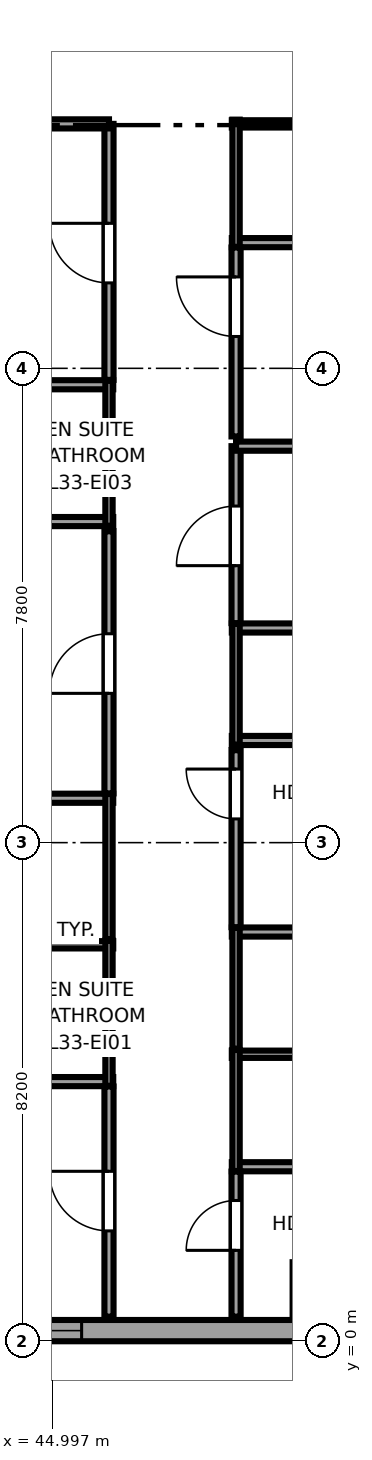
"""IFC4 building model, lengths in metres.
Left out: names, types, materials, properties, quantities, classifications, styles, units other than length and angle.
Written with IfcOpenShell. Run it as: python <this file> out.ifc"""

import sys

from ifc_helpers import new_model, si_unit, direction, frame, frame_2d, origin, place, context, subcontext, project, spatial, rectangle, extrude, source, transform, mapped, element, fill, save


model = new_model("IFC4")
c1 = context("Model", 3, precision=1e-05, world=origin(), true_north=direction((0.0, 1.0)))
c2 = subcontext(c1, "Body", "Model", "MODEL_VIEW")
j1 = project(units=[si_unit("LENGTHUNIT", "METRE"), si_unit("PLANEANGLEUNIT", "RADIAN")], contexts=[c1])
p1 = place(None, origin())
s1 = spatial("IfcSite", under=j1, at=p1, CompositionType="ELEMENT")
p2 = place(p1, origin())
s2 = spatial("IfcBuilding", under=s1, at=p2, CompositionType="ELEMENT")
p3 = place(p2, frame((0.0, 0.0, 129.3)))
s3 = spatial("IfcBuildingStorey", under=s2, at=p3, CompositionType="ELEMENT", Elevation=129.3)
p4 = place(p3, frame((34.375, 0.175, 0.0), z_axis=(0.0, 0.0, 1.0), x_axis=(1.0, 0.0, 0.0)))
e1 = element("IfcWall", 1, at=p4, inside=s3, PredefinedType="SOLIDWALL", context=c2, shape_type="SweptSolid", body=[
    extrude(rectangle(XDim=18.008, YDim=0.35, at=frame_2d((9.004, 0.0))), origin(), (0.0, 0.0, 1.0), 3.37),
])
p5 = place(p4, frame((1.651, 0.0, 0.68)))
e2 = element("IfcOpeningElement", 2, at=p5, cuts=e1, PredefinedType="OPENING", context=c2, shape_type="SweptSolid", body=[
    extrude(rectangle(XDim=2.1, YDim=1.9, at=frame_2d((1.05, 0.95))), frame((0.0, 0.185, 0.0), z_axis=(0.0, -1.0, 0.0), x_axis=(1.0, 0.0, 0.0)), (0.0, 0.0, 1.0), 0.37),
])
p6 = place(p4, frame((9.005, 0.0, 0.68)))
e3 = element("IfcOpeningElement", 3, at=p6, cuts=e1, PredefinedType="OPENING", context=c2, shape_type="SweptSolid", body=[
    extrude(rectangle(XDim=2.1, YDim=1.9, at=frame_2d((1.05, 0.95))), frame((0.0, 0.185, 0.0), z_axis=(0.0, -1.0, 0.0), x_axis=(1.0, 0.0, 0.0)), (0.0, 0.0, 1.0), 0.37),
])
p7 = place(p4, frame((14.991, 0.0, 0.62)))
e4 = element("IfcOpeningElement", 4, at=p7, cuts=e1, PredefinedType="OPENING", context=c2, shape_type="SweptSolid", body=[
    extrude(rectangle(XDim=1.5, YDim=1.55, at=frame_2d((0.75, 0.775))), frame((0.0, 0.185, 0.0), z_axis=(0.0, -1.0, 0.0), x_axis=(1.0, 0.0, 0.0)), (0.0, 0.0, 1.0), 0.37),
])
p8 = place(p3, frame((43.41, 4.27, 0.0), z_axis=(0.0, 0.0, 1.0), x_axis=(1.0, 0.0, 0.0)))
e5 = element("IfcWall", 5, at=p8, inside=s3, PredefinedType="PARTITIONING", context=c2, shape_type="SweptSolid", body=[
    extrude(rectangle(XDim=2.59, YDim=0.15, at=frame_2d((1.295, 0.0))), origin(), (0.0, 0.0, 1.0), 3.37),
])
p9 = place(p3, frame((43.41, 6.52, 0.0), z_axis=(0.0, 0.0, 1.0), x_axis=(1.0, 0.0, 0.0)))
e6 = element("IfcWall", 6, at=p9, inside=s3, PredefinedType="PLUMBINGWALL", context=c2, shape_type="SweptSolid", body=[
    extrude(rectangle(XDim=2.59, YDim=0.12, at=frame_2d((1.295, 0.0))), origin(), (0.0, 0.0, 1.0), 3.37),
])
p10 = place(p3, frame((45.93, 4.2, 0.0), z_axis=(0.0, 0.0, 1.0), x_axis=(0.0, 1.0, 0.0)))
e7 = element("IfcWall", 7, at=p10, inside=s3, PredefinedType="PLUMBINGWALL", context=c2, shape_type="SweptSolid", body=[
    extrude(rectangle(XDim=2.39, YDim=0.12, at=frame_2d((1.195, 0.0))), origin(), (0.0, 0.0, 1.0), 3.37),
])
p11 = place(p3, frame((43.41, 8.93, 0.0), z_axis=(0.0, 0.0, 1.0), x_axis=(1.0, 0.0, 0.0)))
e8 = element("IfcWall", 8, at=p11, inside=s3, PredefinedType="PARTITIONING", context=c2, shape_type="SweptSolid", body=[
    extrude(rectangle(XDim=2.59, YDim=0.15, at=frame_2d((1.295, 0.0))), origin(), (0.0, 0.0, 1.0), 3.37),
])
p12 = place(p3, frame((45.93, 6.61, 0.0), z_axis=(0.0, 0.0, 1.0), x_axis=(0.0, 1.0, 0.0)))
e9 = element("IfcWall", 9, at=p12, inside=s3, PredefinedType="PLUMBINGWALL", context=c2, shape_type="SweptSolid", body=[
    extrude(rectangle(XDim=2.39, YDim=0.12, at=frame_2d((1.195, 0.0))), origin(), (0.0, 0.0, 1.0), 3.37),
])
p13 = place(p3, frame((34.65, 13.48, 0.0), z_axis=(0.0, 0.0, 1.0), x_axis=(1.0, 0.0, 0.0)))
e10 = element("IfcWall", 10, at=p13, inside=s3, PredefinedType="PARTITIONING", context=c2, shape_type="SweptSolid", body=[
    extrude(rectangle(XDim=11.35, YDim=0.15, at=frame_2d((5.675, 0.0))), origin(), (0.0, 0.0, 1.0), 3.37),
])
p14 = place(p3, frame((43.41, 15.73, 0.0), z_axis=(0.0, 0.0, 1.0), x_axis=(1.0, 0.0, 0.0)))
e11 = element("IfcWall", 11, at=p14, inside=s3, PredefinedType="PARTITIONING", context=c2, shape_type="SweptSolid", body=[
    extrude(rectangle(XDim=2.59, YDim=0.15, at=frame_2d((1.295, 0.0))), origin(), (0.0, 0.0, 1.0), 3.37),
])
p15 = place(p3, frame((45.93, 13.41, 0.0), z_axis=(0.0, 0.0, 1.0), x_axis=(0.0, 1.0, 0.0)))
e12 = element("IfcWall", 12, at=p15, inside=s3, PredefinedType="PLUMBINGWALL", context=c2, shape_type="SweptSolid", body=[
    extrude(rectangle(XDim=2.39, YDim=0.12, at=frame_2d((1.195, 0.0))), origin(), (0.0, 0.0, 1.0), 3.37),
])
p16 = place(p3, frame((47.95, 2.87, 0.0), z_axis=(0.0, 0.0, 1.0), x_axis=(1.0, 0.0, 0.0)))
e13 = element("IfcWall", 13, at=p16, inside=s3, PredefinedType="PARTITIONING", context=c2, shape_type="SweptSolid", body=[
    extrude(rectangle(XDim=2.59, YDim=0.15, at=frame_2d((1.295, 0.0))), origin(), (0.0, 0.0, 1.0), 3.37),
])
p17 = place(p3, frame((47.95, 4.72, 0.0), z_axis=(0.0, 0.0, 1.0), x_axis=(1.0, 0.0, 0.0)))
e14 = element("IfcWall", 14, at=p17, inside=s3, PredefinedType="PLUMBINGWALL", context=c2, shape_type="SweptSolid", body=[
    extrude(rectangle(XDim=2.59, YDim=0.12, at=frame_2d((1.295, 0.0))), origin(), (0.0, 0.0, 1.0), 3.37),
])
p18 = place(p3, frame((48.02, 2.8, 0.0), z_axis=(0.0, 0.0, 1.0), x_axis=(0.0, 1.0, 0.0)))
e15 = element("IfcWall", 15, at=p18, inside=s3, PredefinedType="PLUMBINGWALL", context=c2, shape_type="SweptSolid", body=[
    extrude(rectangle(XDim=1.99, YDim=0.12, at=frame_2d((0.995, 0.0))), origin(), (0.0, 0.0, 1.0), 3.37),
])
p19 = place(p3, frame((47.95, 6.73, 0.0), z_axis=(0.0, 0.0, 1.0), x_axis=(1.0, 0.0, 0.0)))
e16 = element("IfcWall", 16, at=p19, inside=s3, PredefinedType="PARTITIONING", context=c2, shape_type="SweptSolid", body=[
    extrude(rectangle(XDim=2.59, YDim=0.15, at=frame_2d((1.295, 0.0))), origin(), (0.0, 0.0, 1.0), 3.37),
])
p20 = place(p3, frame((48.02, 4.81, 0.0), z_axis=(0.0, 0.0, 1.0), x_axis=(0.0, 1.0, 0.0)))
e17 = element("IfcWall", 17, at=p20, inside=s3, PredefinedType="PLUMBINGWALL", context=c2, shape_type="SweptSolid", body=[
    extrude(rectangle(XDim=1.99, YDim=0.12, at=frame_2d((0.995, 0.0))), origin(), (0.0, 0.0, 1.0), 3.37),
])
p21 = place(p3, frame((47.95, 9.88, 0.0), z_axis=(0.0, 0.0, 1.0), x_axis=(1.0, 0.0, 0.0)))
e18 = element("IfcWall", 18, at=p21, inside=s3, PredefinedType="PARTITIONING", context=c2, shape_type="SweptSolid", body=[
    extrude(rectangle(XDim=8.645, YDim=0.15, at=frame_2d((4.323, 0.0))), origin(), (0.0, 0.0, 1.0), 3.37),
])
p22 = place(p3, frame((47.95, 11.73, 0.0), z_axis=(0.0, 0.0, 1.0), x_axis=(1.0, 0.0, 0.0)))
e19 = element("IfcWall", 19, at=p22, inside=s3, PredefinedType="PARTITIONING", context=c2, shape_type="SweptSolid", body=[
    extrude(rectangle(XDim=2.59, YDim=0.15, at=frame_2d((1.295, 0.0))), origin(), (0.0, 0.0, 1.0), 3.37),
])
p23 = place(p3, frame((48.02, 9.81, 0.0), z_axis=(0.0, 0.0, 1.0), x_axis=(0.0, 1.0, 0.0)))
e20 = element("IfcWall", 20, at=p23, inside=s3, PredefinedType="PLUMBINGWALL", context=c2, shape_type="SweptSolid", body=[
    extrude(rectangle(XDim=1.99, YDim=0.12, at=frame_2d((0.995, 0.0))), origin(), (0.0, 0.0, 1.0), 3.37),
])
p24 = place(p3, frame((47.95, 18.067, 0.0), z_axis=(0.0, 0.0, 1.0), x_axis=(1.0, 0.0, 0.0)))
e21 = element("IfcWall", 21, at=p24, inside=s3, PredefinedType="PARTITIONING", context=c2, shape_type="SweptSolid", body=[
    extrude(rectangle(XDim=2.59, YDim=0.15, at=frame_2d((1.295, 0.0))), origin(), (0.0, 0.0, 1.0), 3.37),
])
p25 = place(p3, frame((47.95, 20.02, 0.0), z_axis=(0.0, 0.0, 1.0), x_axis=(1.0, 0.0, 0.0)))
e22 = element("IfcWall", 22, at=p25, inside=s3, PredefinedType="PLUMBINGWALL", context=c2, shape_type="SweptSolid", body=[
    extrude(rectangle(XDim=2.59, YDim=0.12, at=frame_2d((1.295, 0.0))), origin(), (0.0, 0.0, 1.0), 3.37),
])
p26 = place(p3, frame((48.02, 17.997, 0.0), z_axis=(0.0, 0.0, 1.0), x_axis=(0.0, 1.0, 0.0)))
e23 = element("IfcWall", 23, at=p26, inside=s3, PredefinedType="PLUMBINGWALL", context=c2, shape_type="SweptSolid", body=[
    extrude(rectangle(XDim=2.093, YDim=0.12, at=frame_2d((1.046, 0.0))), origin(), (0.0, 0.0, 1.0), 3.37),
])
p27 = place(p3, frame((45.93, 0.405, 0.0), z_axis=(0.0, 0.0, 1.0), x_axis=(0.0, 1.0, 0.0)))
e24 = element("IfcWall", 24, at=p27, inside=s3, PredefinedType="PARTITIONING", context=c2, shape_type="SweptSolid", body=[
    extrude(rectangle(XDim=3.785, YDim=0.15, at=frame_2d((1.893, 0.0))), origin(), (0.0, 0.0, 1.0), 3.37),
])
p28 = place(p27, frame((1.41, 0.0, 0.0)))
e25 = element("IfcOpeningElement", 25, at=p28, cuts=e24, PredefinedType="OPENING", context=c2, shape_type="SweptSolid", body=[
    extrude(rectangle(XDim=0.98, YDim=2.12, at=frame_2d((0.49, 1.06))), frame((0.0, 0.085, 0.0), z_axis=(0.0, -1.0, 0.0), x_axis=(1.0, 0.0, 0.0)), (0.0, 0.0, 1.0), 0.17),
])
p29 = place(p3, frame((45.93, 9.01, 0.0), z_axis=(0.0, 0.0, 1.0), x_axis=(0.0, 1.0, 0.0)))
e26 = element("IfcWall", 26, at=p29, inside=s3, PredefinedType="PARTITIONING", context=c2, shape_type="SweptSolid", body=[
    extrude(rectangle(XDim=4.31, YDim=0.15, at=frame_2d((2.155, 0.0))), origin(), (0.0, 0.0, 1.0), 3.37),
])
p30 = place(p29, frame((1.645, 0.0, 0.0)))
e27 = element("IfcOpeningElement", 27, at=p30, cuts=e26, PredefinedType="OPENING", context=c2, shape_type="SweptSolid", body=[
    extrude(rectangle(XDim=0.98, YDim=2.12, at=frame_2d((0.49, 1.06))), frame((0.0, 0.085, 0.0), z_axis=(0.0, -1.0, 0.0), x_axis=(1.0, 0.0, 0.0)), (0.0, 0.0, 1.0), 0.17),
])
p31 = place(p3, frame((45.93, 15.81, 0.0), z_axis=(0.0, 0.0, 1.0), x_axis=(0.0, 1.0, 0.0)))
e28 = element("IfcWall", 28, at=p31, inside=s3, PredefinedType="PARTITIONING", context=c2, shape_type="SweptSolid", body=[
    extrude(rectangle(XDim=4.21, YDim=0.15, at=frame_2d((2.105, 0.0))), origin(), (0.0, 0.0, 1.0), 3.37),
])
p32 = place(p31, frame((1.595, 0.0, 0.0)))
e29 = element("IfcOpeningElement", 29, at=p32, cuts=e28, PredefinedType="OPENING", context=c2, shape_type="SweptSolid", body=[
    extrude(rectangle(XDim=0.98, YDim=2.12, at=frame_2d((0.49, 1.06))), frame((0.0, 0.085, 0.0), z_axis=(0.0, -1.0, 0.0), x_axis=(1.0, 0.0, 0.0)), (0.0, 0.0, 1.0), 0.17),
])
p33 = place(p3, frame((34.65, 20.02, 0.0), z_axis=(0.0, 0.0, 1.0), x_axis=(1.0, 0.0, 0.0)))
e30 = element("IfcWall", 30, at=p33, inside=s3, PredefinedType="PARTITIONING", context=c2, shape_type="SweptSolid", body=[
    extrude(rectangle(XDim=11.28, YDim=0.15, at=frame_2d((5.64, 0.0))), origin(), (0.0, 0.0, 1.0), 2.954),
])
p34 = place(p3, frame((48.02, 0.405, 0.0), z_axis=(0.0, 0.0, 1.0), x_axis=(0.0, 1.0, 0.0)))
e31 = element("IfcWall", 31, at=p34, inside=s3, PredefinedType="PARTITIONING", context=c2, shape_type="SweptSolid", body=[
    extrude(rectangle(XDim=2.385, YDim=0.15, at=frame_2d((1.192, 0.0))), origin(), (0.0, 0.0, 1.0), 3.37),
])
p35 = place(p34, frame((1.09, 0.0, 0.0)))
e32 = element("IfcOpeningElement", 32, at=p35, cuts=e31, PredefinedType="OPENING", context=c2, shape_type="SweptSolid", body=[
    extrude(rectangle(XDim=0.82, YDim=2.01, at=frame_2d((0.41, 1.005))), frame((0.0, 0.085, 0.0), z_axis=(0.0, -1.0, 0.0), x_axis=(1.0, 0.0, 0.0)), (0.0, 0.0, 1.0), 0.17),
])
p36 = place(p3, frame((48.02, 6.81, 0.0), z_axis=(0.0, 0.0, 1.0), x_axis=(0.0, 1.0, 0.0)))
e33 = element("IfcWall", 33, at=p36, inside=s3, PredefinedType="PARTITIONING", context=c2, shape_type="SweptSolid", body=[
    extrude(rectangle(XDim=2.91, YDim=0.15, at=frame_2d((1.455, 0.0))), origin(), (0.0, 0.0, 1.0), 3.37),
])
p37 = place(p36, frame((1.78, 0.0, 0.0)))
e34 = element("IfcOpeningElement", 34, at=p37, cuts=e33, PredefinedType="OPENING", context=c2, shape_type="SweptSolid", body=[
    extrude(rectangle(XDim=0.82, YDim=2.01, at=frame_2d((0.41, 1.005))), frame((0.0, 0.085, 0.0), z_axis=(0.0, -1.0, 0.0), x_axis=(1.0, 0.0, 0.0)), (0.0, 0.0, 1.0), 0.17),
])
p38 = place(p3, frame((48.02, 11.81, 0.0), z_axis=(0.0, 0.0, 1.0), x_axis=(0.0, 1.0, 0.0)))
e35 = element("IfcWall", 35, at=p38, inside=s3, PredefinedType="PARTITIONING", context=c2, shape_type="SweptSolid", body=[
    extrude(rectangle(XDim=2.91, YDim=0.15, at=frame_2d((1.455, 0.0))), origin(), (0.0, 0.0, 1.0), 3.37),
])
p39 = place(p38, frame((0.945, 0.0, 0.0)))
e36 = element("IfcOpeningElement", 36, at=p39, cuts=e35, PredefinedType="OPENING", context=c2, shape_type="SweptSolid", body=[
    extrude(rectangle(XDim=0.98, YDim=2.12, at=frame_2d((0.49, 1.06))), frame((0.0, 0.085, 0.0), z_axis=(0.0, -1.0, 0.0), x_axis=(1.0, 0.0, 0.0)), (0.0, 0.0, 1.0), 0.17),
])
p40 = place(p3, frame((48.02, 14.72, 0.0), z_axis=(0.0, 0.0, 1.0), x_axis=(1.0, 0.0, 0.0)))
e37 = element("IfcWall", 37, at=p40, inside=s3, PredefinedType="PARTITIONING", context=c2, shape_type="SweptSolid", body=[
    extrude(rectangle(XDim=8.575, YDim=0.15, at=frame_2d((4.288, 0.0))), origin(), (0.0, 0.0, 1.0), 3.37),
])
p41 = place(p3, frame((48.02, 14.88, 0.0), z_axis=(0.0, 0.0, 1.0), x_axis=(0.0, 1.0, 0.0)))
e38 = element("IfcWall", 38, at=p41, inside=s3, PredefinedType="PARTITIONING", context=c2, shape_type="SweptSolid", body=[
    extrude(rectangle(XDim=3.107, YDim=0.15, at=frame_2d((1.554, 0.0))), origin(), (0.0, 0.0, 1.0), 3.37),
])
p42 = place(p41, frame((1.644, 0.0, 0.0)))
e39 = element("IfcOpeningElement", 39, at=p42, cuts=e38, PredefinedType="OPENING", context=c2, shape_type="SweptSolid", body=[
    extrude(rectangle(XDim=0.98, YDim=2.12, at=frame_2d((0.49, 1.06))), frame((0.0, 0.085, 0.0), z_axis=(0.0, -1.0, 0.0), x_axis=(1.0, 0.0, 0.0)), (0.0, 0.0, 1.0), 0.17),
])
m1 = source(origin(), c2, "Body", "SweptSolid", [
    extrude(rectangle(XDim=2.1, YDim=1.9, at=frame_2d((1.05, 0.95))), frame((0.0, 0.09, 0.0), z_axis=(0.0, -1.0, 0.0), x_axis=(1.0, 0.0, 0.0)), (0.0, 0.0, 1.0), 0.06),
])
p43 = place(p6, origin())
e40 = element("IfcWindow", 40, at=p43, inside=s3, PartitioningType="TRIPLE_PANEL_HORIZONTAL", PredefinedType="WINDOW", context=c2, shape_type="MappedRepresentation", body=[
    mapped(m1, transform((0.0, 0.0, 0.0), x_axis=(1.0, 0.0, 0.0), y_axis=(0.0, 1.0, 0.0), z_axis=(0.0, 0.0, 1.0), scale=1.0)),
])
fill(e3, e40)
m2 = source(origin(), c2, "Body", "SweptSolid", [
    extrude(rectangle(XDim=0.98, YDim=2.12, at=frame_2d((0.49, 1.06))), frame((0.0, 0.025, 0.0), z_axis=(0.0, -1.0, 0.0), x_axis=(1.0, 0.0, 0.0)), (0.0, 0.0, 1.0), 0.05),
])
p44 = place(p28, origin())
e41 = element("IfcDoor", 41, at=p44, inside=s3, OperationType="SINGLE_SWING_RIGHT", PredefinedType="DOOR", context=c2, shape_type="MappedRepresentation", body=[
    mapped(m2, transform((0.0, 0.0, 0.0), x_axis=(1.0, 0.0, 0.0), y_axis=(0.0, 1.0, 0.0), z_axis=(0.0, 0.0, 1.0), scale=1.0)),
])
fill(e25, e41)
p45 = place(p30, origin())
e42 = element("IfcDoor", 42, at=p45, inside=s3, OperationType="SINGLE_SWING_LEFT", PredefinedType="DOOR", context=c2, shape_type="MappedRepresentation", body=[
    mapped(m2, transform((0.0, 0.0, 0.0), x_axis=(1.0, 0.0, 0.0), y_axis=(0.0, 1.0, 0.0), z_axis=(0.0, 0.0, 1.0), scale=1.0)),
])
fill(e27, e42)
p46 = place(p32, origin())
e43 = element("IfcDoor", 43, at=p46, inside=s3, OperationType="SINGLE_SWING_RIGHT", PredefinedType="DOOR", context=c2, shape_type="MappedRepresentation", body=[
    mapped(m2, transform((0.0, 0.0, 0.0), x_axis=(1.0, 0.0, 0.0), y_axis=(0.0, 1.0, 0.0), z_axis=(0.0, 0.0, 1.0), scale=1.0)),
])
fill(e29, e43)
m3 = source(origin(), c2, "Body", "SweptSolid", [
    extrude(rectangle(XDim=0.82, YDim=2.01, at=frame_2d((0.41, 1.005))), frame((0.0, 0.025, 0.0), z_axis=(0.0, -1.0, 0.0), x_axis=(1.0, 0.0, 0.0)), (0.0, 0.0, 1.0), 0.05),
])
p47 = place(p35, origin())
e44 = element("IfcDoor", 44, at=p47, inside=s3, OperationType="SINGLE_SWING_LEFT", PredefinedType="DOOR", context=c2, shape_type="MappedRepresentation", body=[
    mapped(m3, transform((0.0, 0.0, 0.0), x_axis=(1.0, 0.0, 0.0), y_axis=(0.0, 1.0, 0.0), z_axis=(0.0, 0.0, 1.0), scale=1.0)),
])
fill(e32, e44)
p48 = place(p37, origin())
e45 = element("IfcDoor", 45, at=p48, inside=s3, OperationType="SINGLE_SWING_RIGHT", PredefinedType="DOOR", context=c2, shape_type="MappedRepresentation", body=[
    mapped(m3, transform((0.0, 0.0, 0.0), x_axis=(1.0, 0.0, 0.0), y_axis=(0.0, 1.0, 0.0), z_axis=(0.0, 0.0, 1.0), scale=1.0)),
])
fill(e34, e45)
p49 = place(p39, origin())
e46 = element("IfcDoor", 46, at=p49, inside=s3, OperationType="SINGLE_SWING_LEFT", PredefinedType="DOOR", context=c2, shape_type="MappedRepresentation", body=[
    mapped(m2, transform((0.0, 0.0, 0.0), x_axis=(1.0, 0.0, 0.0), y_axis=(0.0, 1.0, 0.0), z_axis=(0.0, 0.0, 1.0), scale=1.0)),
])
fill(e36, e46)
p50 = place(p42, origin())
e47 = element("IfcDoor", 47, at=p50, inside=s3, OperationType="SINGLE_SWING_RIGHT", PredefinedType="DOOR", context=c2, shape_type="MappedRepresentation", body=[
    mapped(m2, transform((0.0, 0.0, 0.0), x_axis=(1.0, 0.0, 0.0), y_axis=(0.0, 1.0, 0.0), z_axis=(0.0, 0.0, 1.0), scale=1.0)),
])
fill(e39, e47)
save(model, sys.argv[1])
